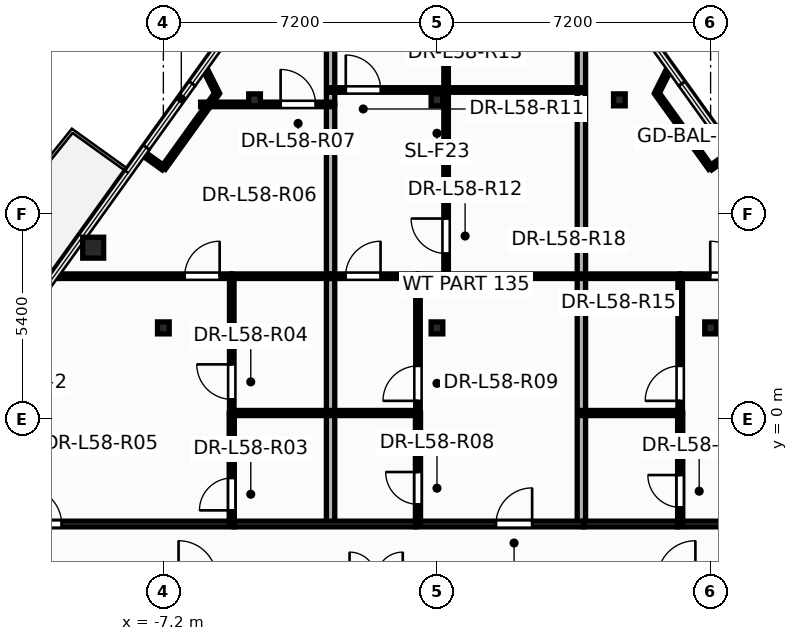
"""IFC4 building model, lengths in metres.
Left out: names, types, materials, properties, quantities, classifications, styles, units other than length and angle.
Written with IfcOpenShell. Run it as: python <this file> out.ifc"""

import sys

from ifc_helpers import new_model, si_unit, direction, frame, frame_2d, origin, origin_2d, place, context, subcontext, project, spatial, rectangle, hollow_circle, i_section, extrude, element, fill, save


model = new_model("IFC4")
c1 = context("Model", 3, precision=1e-05, world=origin(), true_north=direction((0.0, 1.0)))
c2 = subcontext(c1, "Body", "Model", "MODEL_VIEW")
j1 = project(units=[si_unit("LENGTHUNIT", "METRE"), si_unit("PLANEANGLEUNIT", "RADIAN")], contexts=[c1])
p1 = place(None, origin())
s1 = spatial("IfcSite", under=j1, at=p1, CompositionType="ELEMENT")
p2 = place(p1, origin())
s2 = spatial("IfcBuilding", under=s1, at=p2, CompositionType="ELEMENT")
p3 = place(p2, frame((0.0, 0.0, 221.7)))
s3 = spatial("IfcBuildingStorey", under=s2, at=p3, CompositionType="ELEMENT", Elevation=221.7)
p4 = place(p3, frame((-9.046, 4.51, 0.0), z_axis=(0.0, 0.0, 1.0), x_axis=(1.0, 0.0, 0.0)))
e1 = element("IfcColumn", 1, at=p4, inside=s3, PredefinedType="COLUMN", context=c2, shape_type="SweptSolid", body=[
    extrude(hollow_circle(Radius=0.275, WallThickness=0.024, at=origin_2d()), origin(), (0.0, 0.0, 1.0), 3.6),
])
for number, where, z_axis, x_axis in (
    (2, (-7.2, 2.4, 0.0), (0.0, 0.0, 1.0), (1.0, 0.0, 0.0)),
    (3, (0.0, 2.4, 0.0), (0.0, 0.0, 1.0), (1.0, 0.0, 0.0)),
    (4, (7.2, 2.4, 0.0), (0.0, 0.0, 1.0), (1.0, 0.0, 0.0)),
    (5, (-4.8, 8.4, 0.0), (0.0, 0.0, 1.0), (1.0, 0.0, 0.0)),
    (6, (0.0, 8.4, 0.0), (0.0, 0.0, 1.0), (1.0, 0.0, 0.0)),
    (7, (4.8, 8.4, 0.0), (0.0, 0.0, 1.0), (1.0, 0.0, 0.0)),
):
    element("IfcColumn", number, at=place(p3, frame(where, z_axis=z_axis, x_axis=x_axis)), inside=s3, PredefinedType="COLUMN", context=c2, shape_type="SweptSolid", body=[
        extrude(i_section(OverallWidth=0.307, OverallDepth=0.314, WebThickness=0.012, FlangeThickness=0.019, at=origin_2d()), origin(), (0.0, 0.0, 1.0), 3.6),
    ])
p5 = place(p3, frame((-12.5, -2.76, 0.0), z_axis=(0.0, 0.0, 1.0), x_axis=(1.0, 0.0, 0.0)))
e8 = element("IfcWall", 8, at=p5, inside=s3, PredefinedType="PARTITIONING", context=c2, shape_type="SweptSolid", body=[
    extrude(rectangle(XDim=7.16, YDim=0.15, at=frame_2d((3.58, 0.0))), origin(), (0.0, 0.0, 1.0), 2.32),
])
p6 = place(p5, frame((1.672, 0.0, 0.0)))
e9 = element("IfcOpeningElement", 9, at=p6, cuts=e8, PredefinedType="OPENING", context=c2, shape_type="SweptSolid", body=[
    extrude(rectangle(XDim=0.956, YDim=2.104, at=frame_2d((0.475, 1.052))), frame((0.0, 0.085, 0.0), z_axis=(0.0, -1.0, 0.0), x_axis=(1.0, 0.0, 0.0)), (0.0, 0.0, 1.0), 0.17),
])
p7 = place(p3, frame((6.34, -2.76, 0.0), z_axis=(0.0, 0.0, 1.0), x_axis=(1.0, 0.0, 0.0)))
e10 = element("IfcWall", 10, at=p7, inside=s3, PredefinedType="PARTITIONING", context=c2, shape_type="SweptSolid", body=[
    extrude(rectangle(XDim=6.16, YDim=0.15, at=frame_2d((3.08, 0.0))), origin(), (0.0, 0.0, 1.0), 2.32),
])
p8 = place(p7, frame((2.426, 0.0, 0.0)))
e11 = element("IfcOpeningElement", 11, at=p8, cuts=e10, PredefinedType="OPENING", context=c2, shape_type="SweptSolid", body=[
    extrude(rectangle(XDim=0.956, YDim=2.104, at=frame_2d((0.475, 1.052))), frame((0.0, 0.085, 0.0), z_axis=(0.0, -1.0, 0.0), x_axis=(1.0, 0.0, 0.0)), (0.0, 0.0, 1.0), 0.17),
])
p9 = place(p3, frame((-2.8, 8.28, 0.0), z_axis=(0.0, 0.0, 1.0), x_axis=(0.0, 1.0, 0.0)))
e12 = element("IfcWall", 12, at=p9, inside=s3, PredefinedType="PARTITIONING", context=c2, shape_type="SweptSolid", body=[
    extrude(rectangle(XDim=5.273, YDim=0.22, at=frame_2d((2.636, 0.0))), origin(), (0.0, 0.0, 1.0), 2.62),
])
p10 = place(p3, frame((0.24, 3.76, 0.0), z_axis=(0.0, 0.0, 1.0), x_axis=(0.0, 1.0, 0.0)))
e13 = element("IfcWall", 13, at=p10, inside=s3, PredefinedType="PARTITIONING", context=c2, shape_type="SweptSolid", body=[
    extrude(rectangle(XDim=4.9, YDim=0.12, at=frame_2d((2.45, 0.0))), origin(), (0.0, 0.0, 1.0), 2.32),
])
p11 = place(p10, frame((0.597, 0.0, 0.0)))
e14 = element("IfcOpeningElement", 14, at=p11, cuts=e13, PredefinedType="OPENING", context=c2, shape_type="SweptSolid", body=[
    extrude(rectangle(XDim=0.926, YDim=2.104, at=frame_2d((0.46, 1.052))), frame((0.0, 0.07, 0.0), z_axis=(0.0, -1.0, 0.0), x_axis=(1.0, 0.0, 0.0)), (0.0, 0.0, 1.0), 0.14),
])
p12 = place(p3, frame((3.8, -2.76, 0.0), z_axis=(0.0, 0.0, 1.0), x_axis=(0.0, 1.0, 0.0)))
e15 = element("IfcWall", 15, at=p12, inside=s3, PredefinedType="PARTITIONING", context=c2, shape_type="SweptSolid", body=[
    extrude(rectangle(XDim=15.266, YDim=0.22, at=frame_2d((7.633, 0.0))), origin(), (0.0, 0.0, 1.0), 2.32),
])
p13 = place(p3, frame((0.24, 8.66, 0.0), z_axis=(0.0, 0.0, 1.0), x_axis=(0.0, 1.0, 0.0)))
e16 = element("IfcWall", 16, at=p13, inside=s3, PredefinedType="PARTITIONING", context=c2, shape_type="SweptSolid", body=[
    extrude(rectangle(XDim=4.893, YDim=0.12, at=frame_2d((2.447, 0.0))), origin(), (0.0, 0.0, 1.0), 2.863),
])
p14 = place(p13, frame((1.717, 0.0, 0.0)))
e17 = element("IfcOpeningElement", 17, at=p14, cuts=e16, PredefinedType="OPENING", context=c2, shape_type="SweptSolid", body=[
    extrude(rectangle(XDim=0.926, YDim=2.104, at=frame_2d((0.46, 1.052))), frame((0.0, 0.07, 0.0), z_axis=(0.0, -1.0, 0.0), x_axis=(1.0, 0.0, 0.0)), (0.0, 0.0, 1.0), 0.14),
])
p15 = place(p3, frame((-10.077, 3.76, 0.0), z_axis=(0.0, 0.0, 1.0), x_axis=(1.0, 0.0, 0.0)))
e18 = element("IfcWall", 18, at=p15, inside=s3, PredefinedType="PARTITIONING", context=c2, shape_type="SweptSolid", body=[
    extrude(rectangle(XDim=4.677, YDim=0.12, at=frame_2d((2.339, 0.0))), origin(), (0.0, 0.0, 1.0), 2.62),
])
p16 = place(p15, frame((3.439, 0.0, 0.0)))
e19 = element("IfcOpeningElement", 19, at=p16, cuts=e18, PredefinedType="OPENING", context=c2, shape_type="SweptSolid", body=[
    extrude(rectangle(XDim=0.926, YDim=2.104, at=frame_2d((0.46, 1.052))), frame((0.0, 0.07, 0.0), z_axis=(0.0, -1.0, 0.0), x_axis=(1.0, 0.0, 0.0)), (0.0, 0.0, 1.0), 0.14),
])
p17 = place(p3, frame((-2.8, -2.76, 0.0), z_axis=(0.0, 0.0, 1.0), x_axis=(0.0, 1.0, 0.0)))
e20 = element("IfcWall", 20, at=p17, inside=s3, PredefinedType="PARTITIONING", context=c2, shape_type="SweptSolid", body=[
    extrude(rectangle(XDim=11.04, YDim=0.22, at=frame_2d((5.52, 0.0))), origin(), (0.0, 0.0, 1.0), 2.32),
])
p18 = place(p3, frame((-0.56, -2.76, 0.0), z_axis=(0.0, 0.0, 1.0), x_axis=(1.0, 0.0, 0.0)))
e21 = element("IfcWall", 21, at=p18, inside=s3, PredefinedType="PARTITIONING", context=c2, shape_type="SweptSolid", body=[
    extrude(rectangle(XDim=4.42, YDim=0.15, at=frame_2d((2.21, 0.0))), origin(), (0.0, 0.0, 1.0), 2.32),
])
p19 = place(p18, frame((2.114, 0.0, 0.0)))
e22 = element("IfcOpeningElement", 22, at=p19, cuts=e21, PredefinedType="OPENING", context=c2, shape_type="SweptSolid", body=[
    extrude(rectangle(XDim=0.956, YDim=2.104, at=frame_2d((0.475, 1.052))), frame((0.0, 0.085, 0.0), z_axis=(0.0, -1.0, 0.0), x_axis=(1.0, 0.0, 0.0)), (0.0, 0.0, 1.0), 0.17),
])
p20 = place(p3, frame((6.4, 3.76, 0.0), z_axis=(0.0, 0.0, 1.0), x_axis=(1.0, 0.0, 0.0)))
e23 = element("IfcWall", 23, at=p20, inside=s3, PredefinedType="PARTITIONING", context=c2, shape_type="SweptSolid", body=[
    extrude(rectangle(XDim=3.677, YDim=0.12, at=frame_2d((1.839, 0.0))), origin(), (0.0, 0.0, 1.0), 2.62),
])
p21 = place(p20, frame((0.791, 0.0, 0.0)))
e24 = element("IfcOpeningElement", 24, at=p21, cuts=e23, PredefinedType="OPENING", context=c2, shape_type="SweptSolid", body=[
    extrude(rectangle(XDim=0.926, YDim=2.104, at=frame_2d((0.46, 1.052))), frame((0.0, 0.07, 0.0), z_axis=(0.0, -1.0, 0.0), x_axis=(1.0, 0.0, 0.0)), (0.0, 0.0, 1.0), 0.14),
])
p22 = place(p3, frame((-0.5, 3.76, 0.0), z_axis=(0.0, 0.0, 1.0), x_axis=(1.0, 0.0, 0.0)))
e25 = element("IfcWall", 25, at=p22, inside=s3, PredefinedType="PARTITIONING", context=c2, shape_type="SweptSolid", body=[
    extrude(rectangle(XDim=6.9, YDim=0.12, at=frame_2d((3.45, 0.0))), origin(), (0.0, 0.0, 1.0), 2.32),
])
p23 = place(p3, frame((-5.4, 0.16, 0.0), z_axis=(0.0, 0.0, 1.0), x_axis=(0.0, 1.0, 0.0)))
e26 = element("IfcWall", 26, at=p23, inside=s3, PredefinedType="PARTITIONING", context=c2, shape_type="SweptSolid", body=[
    extrude(rectangle(XDim=3.6, YDim=0.12, at=frame_2d((1.8, 0.0))), origin(), (0.0, 0.0, 1.0), 2.32),
])
p24 = place(p23, frame((0.36, 0.0, 0.0)))
e27 = element("IfcOpeningElement", 27, at=p24, cuts=e26, PredefinedType="OPENING", context=c2, shape_type="SweptSolid", body=[
    extrude(rectangle(XDim=0.926, YDim=2.104, at=frame_2d((0.46, 1.052))), frame((0.0, 0.07, 0.0), z_axis=(0.0, -1.0, 0.0), x_axis=(1.0, 0.0, 0.0)), (0.0, 0.0, 1.0), 0.14),
])
p25 = place(p3, frame((-0.5, 0.16, 0.0), z_axis=(0.0, 0.0, 1.0), x_axis=(0.0, 1.0, 0.0)))
e28 = element("IfcWall", 28, at=p25, inside=s3, PredefinedType="PARTITIONING", context=c2, shape_type="SweptSolid", body=[
    extrude(rectangle(XDim=3.6, YDim=0.12, at=frame_2d((1.8, 0.0))), origin(), (0.0, 0.0, 1.0), 2.32),
])
p26 = place(p25, frame((0.32, 0.0, 0.0)))
e29 = element("IfcOpeningElement", 29, at=p26, cuts=e28, PredefinedType="OPENING", context=c2, shape_type="SweptSolid", body=[
    extrude(rectangle(XDim=0.926, YDim=2.104, at=frame_2d((0.46, 1.052))), frame((0.0, 0.07, 0.0), z_axis=(0.0, -1.0, 0.0), x_axis=(1.0, 0.0, 0.0)), (0.0, 0.0, 1.0), 0.14),
])
p27 = place(p3, frame((6.4, 0.16, 0.0), z_axis=(0.0, 0.0, 1.0), x_axis=(0.0, 1.0, 0.0)))
e30 = element("IfcWall", 30, at=p27, inside=s3, PredefinedType="PARTITIONING", context=c2, shape_type="SweptSolid", body=[
    extrude(rectangle(XDim=3.6, YDim=0.12, at=frame_2d((1.8, 0.0))), origin(), (0.0, 0.0, 1.0), 2.32),
])
p28 = place(p27, frame((0.32, 0.0, 0.0)))
e31 = element("IfcOpeningElement", 31, at=p28, cuts=e30, PredefinedType="OPENING", context=c2, shape_type="SweptSolid", body=[
    extrude(rectangle(XDim=0.926, YDim=2.104, at=frame_2d((0.46, 1.052))), frame((0.0, 0.07, 0.0), z_axis=(0.0, -1.0, 0.0), x_axis=(1.0, 0.0, 0.0)), (0.0, 0.0, 1.0), 0.14),
])
p29 = place(p3, frame((0.24, 8.66, 0.0), z_axis=(0.0, 0.0, 1.0), x_axis=(1.0, 0.0, 0.0)))
e32 = element("IfcWall", 32, at=p29, inside=s3, PredefinedType="PARTITIONING", context=c2, shape_type="SweptSolid", body=[
    extrude(rectangle(XDim=3.56, YDim=0.12, at=frame_2d((1.78, 0.0))), origin(), (0.0, 0.0, 1.0), 3.345),
])
p30 = place(p3, frame((-6.22, 8.28, 0.0), z_axis=(0.0, 0.0, 1.0), x_axis=(1.0, 0.0, 0.0)))
e33 = element("IfcWall", 33, at=p30, inside=s3, PredefinedType="PARTITIONING", context=c2, shape_type="SweptSolid", body=[
    extrude(rectangle(XDim=3.42, YDim=0.12, at=frame_2d((1.71, 0.0))), origin(), (0.0, 0.0, 1.0), 2.62),
])
p31 = place(p30, frame((2.105, 0.0, 0.0)))
e34 = element("IfcOpeningElement", 34, at=p31, cuts=e33, PredefinedType="OPENING", context=c2, shape_type="SweptSolid", body=[
    extrude(rectangle(XDim=0.926, YDim=2.104, at=frame_2d((0.46, 1.052))), frame((0.0, 0.07, 0.0), z_axis=(0.0, -1.0, 0.0), x_axis=(1.0, 0.0, 0.0)), (0.0, 0.0, 1.0), 0.14),
])
p32 = place(p3, frame((-2.8, 8.66, 0.0), z_axis=(0.0, 0.0, 1.0), x_axis=(1.0, 0.0, 0.0)))
e35 = element("IfcWall", 35, at=p32, inside=s3, PredefinedType="PARTITIONING", context=c2, shape_type="SweptSolid", body=[
    extrude(rectangle(XDim=3.04, YDim=0.12, at=frame_2d((1.52, 0.0))), origin(), (0.0, 0.0, 1.0), 3.345),
])
p33 = place(p32, frame((0.4, 0.0, 0.0)))
e36 = element("IfcOpeningElement", 36, at=p33, cuts=e35, PredefinedType="OPENING", context=c2, shape_type="SweptSolid", body=[
    extrude(rectangle(XDim=0.926, YDim=2.104, at=frame_2d((0.46, 1.052))), frame((0.0, 0.07, 0.0), z_axis=(0.0, -1.0, 0.0), x_axis=(1.0, 0.0, 0.0)), (0.0, 0.0, 1.0), 0.14),
])
p34 = place(p3, frame((-5.4, -2.76, 0.0), z_axis=(0.0, 0.0, 1.0), x_axis=(0.0, 1.0, 0.0)))
e37 = element("IfcWall", 37, at=p34, inside=s3, PredefinedType="PARTITIONING", context=c2, shape_type="SweptSolid", body=[
    extrude(rectangle(XDim=2.92, YDim=0.135, at=frame_2d((1.46, 0.0))), origin(), (0.0, 0.0, 1.0), 3.345),
])
p35 = place(p34, frame((0.359, 0.0, 0.0)))
e38 = element("IfcOpeningElement", 38, at=p35, cuts=e37, PredefinedType="OPENING", context=c2, shape_type="SweptSolid", body=[
    extrude(rectangle(XDim=0.856, YDim=2.104, at=frame_2d((0.425, 1.052))), frame((0.0, 0.078, 0.0), z_axis=(0.0, -1.0, 0.0), x_axis=(1.0, 0.0, 0.0)), (0.0, 0.0, 1.0), 0.155),
])
p36 = place(p3, frame((-0.5, -2.76, 0.0), z_axis=(0.0, 0.0, 1.0), x_axis=(0.0, 1.0, 0.0)))
e39 = element("IfcWall", 39, at=p36, inside=s3, PredefinedType="PARTITIONING", context=c2, shape_type="SweptSolid", body=[
    extrude(rectangle(XDim=2.92, YDim=0.135, at=frame_2d((1.46, 0.0))), origin(), (0.0, 0.0, 1.0), 3.345),
])
p37 = place(p36, frame((0.518, 0.0, 0.0)))
e40 = element("IfcOpeningElement", 40, at=p37, cuts=e39, PredefinedType="OPENING", context=c2, shape_type="SweptSolid", body=[
    extrude(rectangle(XDim=0.856, YDim=2.104, at=frame_2d((0.425, 1.052))), frame((0.0, 0.078, 0.0), z_axis=(0.0, -1.0, 0.0), x_axis=(1.0, 0.0, 0.0)), (0.0, 0.0, 1.0), 0.155),
])
p38 = place(p3, frame((6.4, -2.76, 0.0), z_axis=(0.0, 0.0, 1.0), x_axis=(0.0, 1.0, 0.0)))
e41 = element("IfcWall", 41, at=p38, inside=s3, PredefinedType="PARTITIONING", context=c2, shape_type="SweptSolid", body=[
    extrude(rectangle(XDim=2.92, YDim=0.135, at=frame_2d((1.46, 0.0))), origin(), (0.0, 0.0, 1.0), 3.345),
])
p39 = place(p38, frame((0.438, 0.0, 0.0)))
e42 = element("IfcOpeningElement", 42, at=p39, cuts=e41, PredefinedType="OPENING", context=c2, shape_type="SweptSolid", body=[
    extrude(rectangle(XDim=0.856, YDim=2.104, at=frame_2d((0.425, 1.052))), frame((0.0, 0.078, 0.0), z_axis=(0.0, -1.0, 0.0), x_axis=(1.0, 0.0, 0.0)), (0.0, 0.0, 1.0), 0.155),
])
p40 = place(p3, frame((-5.338, -2.76, 0.0), z_axis=(0.0, 0.0, 1.0), x_axis=(1.0, 0.0, 0.0)))
e43 = element("IfcWall", 43, at=p40, inside=s3, PredefinedType="PARTITIONING", context=c2, shape_type="SweptSolid", body=[
    extrude(rectangle(XDim=4.776, YDim=0.15, at=frame_2d((2.388, 0.0))), origin(), (0.0, 0.0, 1.0), 2.964),
])
p41 = place(p3, frame((3.862, -2.76, 0.0), z_axis=(0.0, 0.0, 1.0), x_axis=(1.0, 0.0, 0.0)))
e44 = element("IfcWall", 44, at=p41, inside=s3, PredefinedType="PARTITIONING", context=c2, shape_type="SweptSolid", body=[
    extrude(rectangle(XDim=2.476, YDim=0.15, at=frame_2d((1.238, 0.0))), origin(), (0.0, 0.0, 1.0), 3.345),
])
p42 = place(p3, frame((-5.4, 0.16, 0.0), z_axis=(0.0, 0.0, 1.0), x_axis=(1.0, 0.0, 0.0)))
e45 = element("IfcWall", 45, at=p42, inside=s3, PredefinedType="PARTITIONING", context=c2, shape_type="SweptSolid", body=[
    extrude(rectangle(XDim=4.9, YDim=0.135, at=frame_2d((2.45, 0.0))), origin(), (0.0, 0.0, 1.0), 2.964),
])
p43 = place(p3, frame((-5.4, 3.76, 0.0), z_axis=(0.0, 0.0, 1.0), x_axis=(1.0, 0.0, 0.0)))
e46 = element("IfcWall", 46, at=p43, inside=s3, PredefinedType="PARTITIONING", context=c2, shape_type="SweptSolid", body=[
    extrude(rectangle(XDim=2.6, YDim=0.12, at=frame_2d((1.3, 0.0))), origin(), (0.0, 0.0, 1.0), 3.345),
])
p44 = place(p3, frame((3.8, 0.16, 0.0), z_axis=(0.0, 0.0, 1.0), x_axis=(1.0, 0.0, 0.0)))
e47 = element("IfcWall", 47, at=p44, inside=s3, PredefinedType="PARTITIONING", context=c2, shape_type="SweptSolid", body=[
    extrude(rectangle(XDim=2.6, YDim=0.135, at=frame_2d((1.3, 0.0))), origin(), (0.0, 0.0, 1.0), 3.345),
])
for number, where, z_axis, x_axis in (
    (48, (-5.785, 8.574, 0.0), (0.0, 0.0, 1.0), (-0.583, -0.812, 0.0)),
    (49, (7.197, 6.607, 0.0), (0.0, 0.0, 1.0), (-0.583, 0.812, 0.0)),
):
    element("IfcWall", number, at=place(p3, frame(where, z_axis=z_axis, x_axis=x_axis)), inside=s3, PredefinedType="PARTITIONING", context=c2, shape_type="SweptSolid", body=[
        extrude(rectangle(XDim=2.421, YDim=0.12, at=frame_2d((1.21, 0.0))), origin(), (0.0, 0.0, 1.0), 3.345),
    ])
p45 = place(p3, frame((-2.8, 3.76, 0.0), z_axis=(0.0, 0.0, 1.0), x_axis=(1.0, 0.0, 0.0)))
e50 = element("IfcWall", 50, at=p45, inside=s3, PredefinedType="PARTITIONING", context=c2, shape_type="SweptSolid", body=[
    extrude(rectangle(XDim=2.3, YDim=0.12, at=frame_2d((1.15, 0.0))), origin(), (0.0, 0.0, 1.0), 2.964),
])
p46 = place(p45, frame((0.395, 0.0, 0.0)))
e51 = element("IfcOpeningElement", 51, at=p46, cuts=e50, PredefinedType="OPENING", context=c2, shape_type="SweptSolid", body=[
    extrude(rectangle(XDim=0.926, YDim=2.104, at=frame_2d((0.46, 1.052))), frame((0.0, 0.07, 0.0), z_axis=(0.0, -1.0, 0.0), x_axis=(1.0, 0.0, 0.0)), (0.0, 0.0, 1.0), 0.14),
])
for number, where, z_axis, x_axis in (
    (52, (-6.124, 9.251, 0.0), (0.0, 0.0, 1.0), (0.447, -0.894, 0.0)),
    (53, (5.785, 8.574, 0.0), (0.0, 0.0, 1.0), (0.447, 0.894, 0.0)),
):
    element("IfcWall", number, at=place(p3, frame(where, z_axis=z_axis, x_axis=x_axis)), inside=s3, PredefinedType="PARTITIONING", context=c2, shape_type="SweptSolid", body=[
        extrude(rectangle(XDim=0.757, YDim=0.12, at=frame_2d((0.378, 0.0))), origin(), (0.0, 0.0, 1.0), 2.863),
    ])
for number, where, z_axis, x_axis in (
    (54, (-7.197, 6.607, 0.0), (0.0, 0.0, 1.0), (-0.813, 0.583, 0.0)),
    (55, (7.741, 6.998, 0.0), (0.0, 0.0, 1.0), (-0.813, -0.583, 0.0)),
):
    element("IfcWall", number, at=place(p3, frame(where, z_axis=z_axis, x_axis=x_axis)), inside=s3, PredefinedType="PARTITIONING", context=c2, shape_type="SweptSolid", body=[
        extrude(rectangle(XDim=0.67, YDim=0.12, at=frame_2d((0.335, 0.0))), origin(), (0.0, 0.0, 1.0), 2.863),
    ])
p47 = place(p35, origin())
e56 = element("IfcDoor", 56, at=p47, inside=s3, OperationType="SINGLE_SWING_LEFT", PredefinedType="DOOR", context=c2, shape_type="SweptSolid", body=[
    extrude(rectangle(XDim=0.85, YDim=2.1, at=frame_2d((0.425, 1.05))), frame((0.0, 0.025, 0.0), z_axis=(0.0, -1.0, 0.0), x_axis=(1.0, 0.0, 0.0)), (0.0, 0.0, 1.0), 0.05),
])
fill(e38, e56)
p48 = place(p24, origin())
e57 = element("IfcDoor", 57, at=p48, inside=s3, OperationType="SINGLE_SWING_RIGHT", PredefinedType="DOOR", context=c2, shape_type="SweptSolid", body=[
    extrude(rectangle(XDim=0.92, YDim=2.1, at=frame_2d((0.46, 1.05))), frame((0.0, 0.025, 0.0), z_axis=(0.0, -1.0, 0.0), x_axis=(1.0, 0.0, 0.0)), (0.0, 0.0, 1.0), 0.05),
])
fill(e27, e57)
p49 = place(p6, origin())
e58 = element("IfcDoor", 58, at=p49, inside=s3, OperationType="SINGLE_SWING_LEFT", PredefinedType="DOOR", context=c2, shape_type="SweptSolid", body=[
    extrude(rectangle(XDim=0.95, YDim=2.1, at=frame_2d((0.475, 1.05))), frame((0.0, 0.025, 0.0), z_axis=(0.0, -1.0, 0.0), x_axis=(1.0, 0.0, 0.0)), (0.0, 0.0, 1.0), 0.05),
])
fill(e9, e58)
p50 = place(p16, origin())
e59 = element("IfcDoor", 59, at=p50, inside=s3, OperationType="SINGLE_SWING_RIGHT", PredefinedType="DOOR", context=c2, shape_type="SweptSolid", body=[
    extrude(rectangle(XDim=0.92, YDim=2.1, at=frame_2d((0.46, 1.05))), frame((0.0, 0.025, 0.0), z_axis=(0.0, -1.0, 0.0), x_axis=(1.0, 0.0, 0.0)), (0.0, 0.0, 1.0), 0.05),
])
fill(e19, e59)
p51 = place(p31, origin())
e60 = element("IfcDoor", 60, at=p51, inside=s3, OperationType="SINGLE_SWING_LEFT", PredefinedType="DOOR", context=c2, shape_type="SweptSolid", body=[
    extrude(rectangle(XDim=0.92, YDim=2.1, at=frame_2d((0.46, 1.05))), frame((0.0, 0.025, 0.0), z_axis=(0.0, -1.0, 0.0), x_axis=(1.0, 0.0, 0.0)), (0.0, 0.0, 1.0), 0.05),
])
fill(e34, e60)
p52 = place(p37, origin())
e61 = element("IfcDoor", 61, at=p52, inside=s3, OperationType="SINGLE_SWING_RIGHT", PredefinedType="DOOR", context=c2, shape_type="SweptSolid", body=[
    extrude(rectangle(XDim=0.85, YDim=2.1, at=frame_2d((0.425, 1.05))), frame((0.0, 0.025, 0.0), z_axis=(0.0, -1.0, 0.0), x_axis=(1.0, 0.0, 0.0)), (0.0, 0.0, 1.0), 0.05),
])
fill(e40, e61)
p53 = place(p26, origin())
e62 = element("IfcDoor", 62, at=p53, inside=s3, OperationType="SINGLE_SWING_LEFT", PredefinedType="DOOR", context=c2, shape_type="SweptSolid", body=[
    extrude(rectangle(XDim=0.92, YDim=2.1, at=frame_2d((0.46, 1.05))), frame((0.0, 0.025, 0.0), z_axis=(0.0, -1.0, 0.0), x_axis=(1.0, 0.0, 0.0)), (0.0, 0.0, 1.0), 0.05),
])
fill(e29, e62)
p54 = place(p19, origin())
e63 = element("IfcDoor", 63, at=p54, inside=s3, OperationType="SINGLE_SWING_RIGHT", PredefinedType="DOOR", context=c2, shape_type="SweptSolid", body=[
    extrude(rectangle(XDim=0.95, YDim=2.1, at=frame_2d((0.475, 1.05))), frame((0.0, 0.025, 0.0), z_axis=(0.0, -1.0, 0.0), x_axis=(1.0, 0.0, 0.0)), (0.0, 0.0, 1.0), 0.05),
])
fill(e22, e63)
p55 = place(p33, origin())
e64 = element("IfcDoor", 64, at=p55, inside=s3, OperationType="SINGLE_SWING_LEFT", PredefinedType="DOOR", context=c2, shape_type="SweptSolid", body=[
    extrude(rectangle(XDim=0.92, YDim=2.1, at=frame_2d((0.46, 1.05))), frame((0.0, 0.025, 0.0), z_axis=(0.0, -1.0, 0.0), x_axis=(1.0, 0.0, 0.0)), (0.0, 0.0, 1.0), 0.05),
])
fill(e36, e64)
p56 = place(p11, origin())
e65 = element("IfcDoor", 65, at=p56, inside=s3, OperationType="SINGLE_SWING_RIGHT", PredefinedType="DOOR", context=c2, shape_type="SweptSolid", body=[
    extrude(rectangle(XDim=0.92, YDim=2.1, at=frame_2d((0.46, 1.05))), frame((0.0, 0.025, 0.0), z_axis=(0.0, -1.0, 0.0), x_axis=(1.0, 0.0, 0.0)), (0.0, 0.0, 1.0), 0.05),
])
fill(e14, e65)
p57 = place(p39, origin())
e66 = element("IfcDoor", 66, at=p57, inside=s3, OperationType="SINGLE_SWING_RIGHT", PredefinedType="DOOR", context=c2, shape_type="SweptSolid", body=[
    extrude(rectangle(XDim=0.85, YDim=2.1, at=frame_2d((0.425, 1.05))), frame((0.0, 0.025, 0.0), z_axis=(0.0, -1.0, 0.0), x_axis=(1.0, 0.0, 0.0)), (0.0, 0.0, 1.0), 0.05),
])
fill(e42, e66)
p58 = place(p28, origin())
e67 = element("IfcDoor", 67, at=p58, inside=s3, OperationType="SINGLE_SWING_LEFT", PredefinedType="DOOR", context=c2, shape_type="SweptSolid", body=[
    extrude(rectangle(XDim=0.92, YDim=2.1, at=frame_2d((0.46, 1.05))), frame((0.0, 0.025, 0.0), z_axis=(0.0, -1.0, 0.0), x_axis=(1.0, 0.0, 0.0)), (0.0, 0.0, 1.0), 0.05),
])
fill(e31, e67)
p59 = place(p21, origin())
e68 = element("IfcDoor", 68, at=p59, inside=s3, OperationType="SINGLE_SWING_LEFT", PredefinedType="DOOR", context=c2, shape_type="SweptSolid", body=[
    extrude(rectangle(XDim=0.92, YDim=2.1, at=frame_2d((0.46, 1.05))), frame((0.0, 0.025, 0.0), z_axis=(0.0, -1.0, 0.0), x_axis=(1.0, 0.0, 0.0)), (0.0, 0.0, 1.0), 0.05),
])
fill(e24, e68)
p60 = place(p46, origin())
e69 = element("IfcDoor", 69, at=p60, inside=s3, OperationType="SINGLE_SWING_RIGHT", PredefinedType="DOOR", context=c2, shape_type="SweptSolid", body=[
    extrude(rectangle(XDim=0.92, YDim=2.1, at=frame_2d((0.46, 1.05))), frame((0.0, 0.025, 0.0), z_axis=(0.0, -1.0, 0.0), x_axis=(1.0, 0.0, 0.0)), (0.0, 0.0, 1.0), 0.05),
])
fill(e51, e69)
save(model, sys.argv[1])
